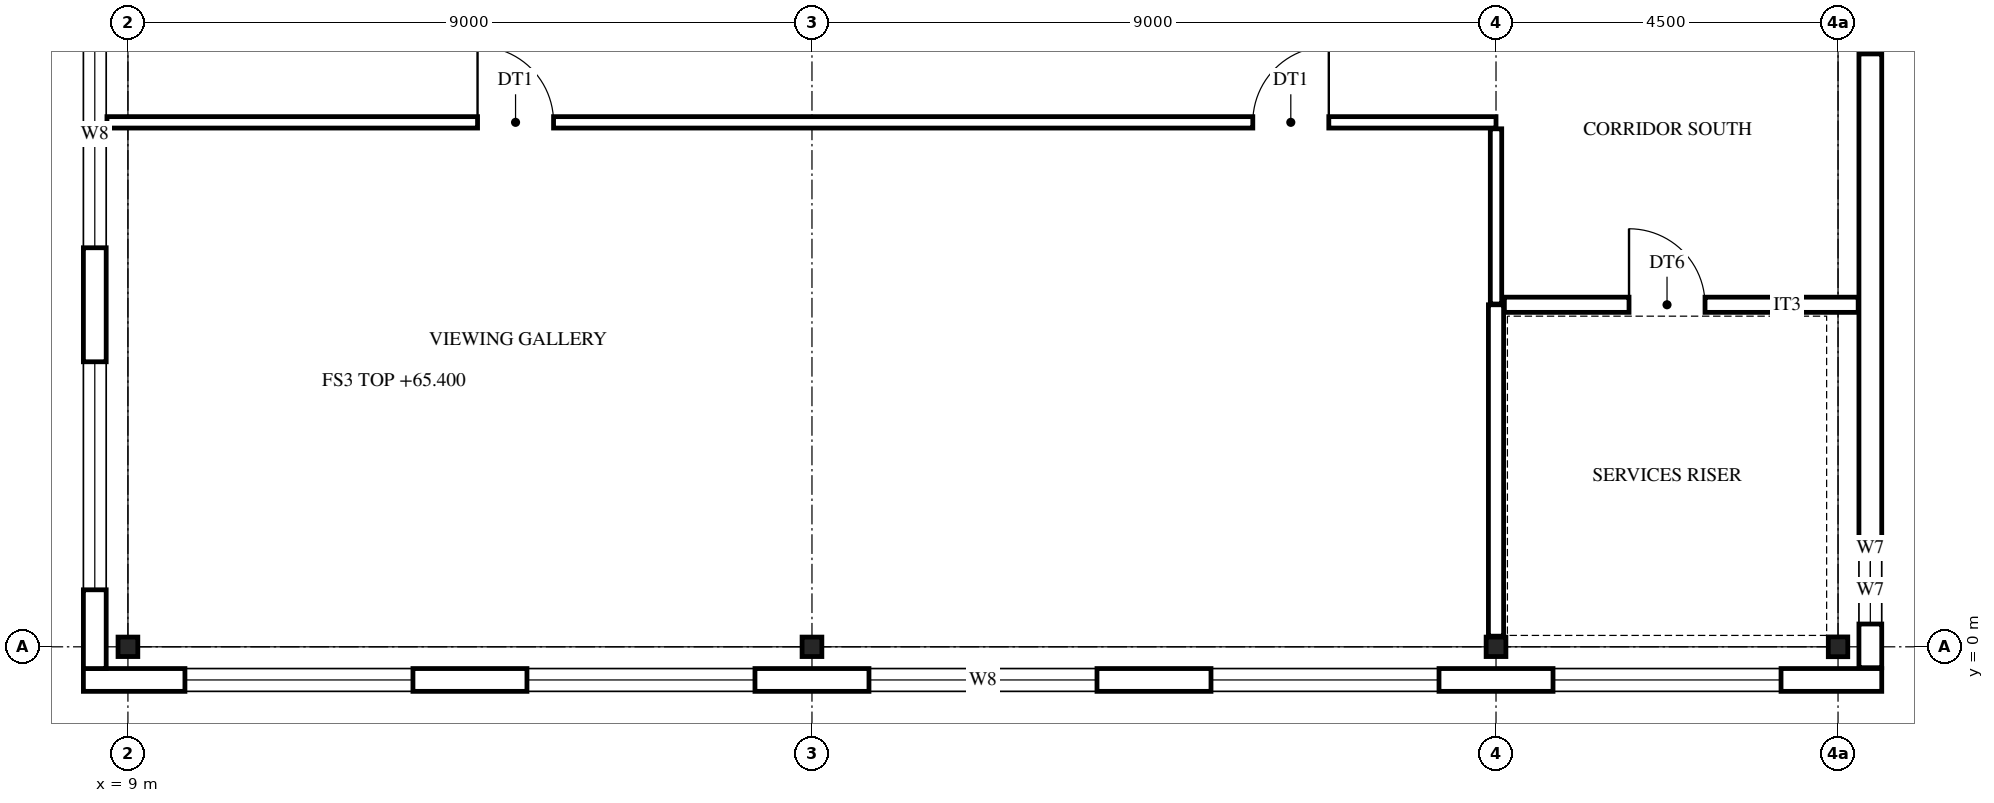
"""IFC4 building model, lengths in metres.
Left out: names, types, materials, properties, quantities, classifications, styles, units other than length and angle.
Written with IfcOpenShell. Run it as: python <this file> out.ifc"""

import sys

from ifc_helpers import new_model, si_unit, direction, frame, frame_2d, origin, origin_2d, place, context, subcontext, project, spatial, rectangle, i_section, extrude, element, fill, save


model = new_model("IFC4")
c1 = context("Model", 3, precision=1e-05, world=origin(), true_north=direction((0.0, 1.0)))
c2 = subcontext(c1, "Body", "Model", "MODEL_VIEW")
j1 = project(units=[si_unit("LENGTHUNIT", "METRE"), si_unit("PLANEANGLEUNIT", "RADIAN")], contexts=[c1])
p1 = place(None, origin())
s1 = spatial("IfcSite", under=j1, at=p1, CompositionType="ELEMENT")
p2 = place(p1, origin())
s2 = spatial("IfcBuilding", under=s1, at=p2, CompositionType="ELEMENT")
p3 = place(p2, frame((0.0, 0.0, 65.4)))
s3 = spatial("IfcBuildingStorey", under=s2, at=p3, CompositionType="ELEMENT", Elevation=65.4)
for number, where, z_axis, x_axis in (
    (1, (9.0, 0.0, 0.0), (0.0, 0.0, 1.0), (0.0, 1.0, 0.0)),
    (2, (18.0, 0.0, 0.0), (0.0, 0.0, 1.0), (0.0, 1.0, 0.0)),
    (3, (27.0, 0.0, 0.0), (0.0, 0.0, 1.0), (0.0, 1.0, 0.0)),
    (4, (31.5, 0.0, 0.0), (0.0, 0.0, 1.0), (1.0, 0.0, 0.0)),
):
    element("IfcColumn", number, at=place(p3, frame(where, z_axis=z_axis, x_axis=x_axis)), inside=s3, PredefinedType="COLUMN", context=c2, shape_type="SweptSolid", body=[
        extrude(i_section(OverallWidth=0.256, OverallDepth=0.26, WebThickness=0.01, FlangeThickness=0.017, FilletRadius=0.014, at=origin_2d()), origin(), (0.0, 0.0, 1.0), 4.5),
    ])
p4 = place(p3, frame((32.075, -0.436, 0.0), z_axis=(0.0, 0.0, 1.0), x_axis=(-1.0, 0.0, 0.0)))
e5 = element("IfcWall", 5, at=p4, inside=s3, PredefinedType="STANDARD", context=c2, shape_type="SweptSolid", body=[
    extrude(rectangle(XDim=23.661, YDim=0.3, at=frame_2d((11.831, 0.0))), origin(), (0.0, 0.0, 1.0), 4.5),
])
p5 = place(p4, frame((19.325, 0.0, 0.6)))
e6 = element("IfcOpeningElement", 6, at=p5, cuts=e5, PredefinedType="OPENING", context=c2, shape_type="SweptSolid", body=[
    extrude(rectangle(XDim=3.0, YDim=3.1, at=frame_2d((1.5, 1.55))), frame((0.0, 0.16, 0.0), z_axis=(0.0, -1.0, 0.0), x_axis=(1.0, 0.0, 0.0)), (0.0, 0.0, 1.0), 0.32),
])
p6 = place(p4, frame((14.825, 0.0, 0.6)))
e7 = element("IfcOpeningElement", 7, at=p6, cuts=e5, PredefinedType="OPENING", context=c2, shape_type="SweptSolid", body=[
    extrude(rectangle(XDim=3.0, YDim=3.1, at=frame_2d((1.5, 1.55))), frame((0.0, 0.16, 0.0), z_axis=(0.0, -1.0, 0.0), x_axis=(1.0, 0.0, 0.0)), (0.0, 0.0, 1.0), 0.32),
])
p7 = place(p4, frame((10.325, 0.0, 0.6)))
e8 = element("IfcOpeningElement", 8, at=p7, cuts=e5, PredefinedType="OPENING", context=c2, shape_type="SweptSolid", body=[
    extrude(rectangle(XDim=3.0, YDim=3.1, at=frame_2d((1.5, 1.55))), frame((0.0, 0.16, 0.0), z_axis=(0.0, -1.0, 0.0), x_axis=(1.0, 0.0, 0.0)), (0.0, 0.0, 1.0), 0.32),
])
p8 = place(p4, frame((5.825, 0.0, 0.6)))
e9 = element("IfcOpeningElement", 9, at=p8, cuts=e5, PredefinedType="OPENING", context=c2, shape_type="SweptSolid", body=[
    extrude(rectangle(XDim=3.0, YDim=3.1, at=frame_2d((1.5, 1.55))), frame((0.0, 0.16, 0.0), z_axis=(0.0, -1.0, 0.0), x_axis=(1.0, 0.0, 0.0)), (0.0, 0.0, 1.0), 0.32),
])
p9 = place(p4, frame((1.325, 0.0, 0.6)))
e10 = element("IfcOpeningElement", 10, at=p9, cuts=e5, PredefinedType="OPENING", context=c2, shape_type="SweptSolid", body=[
    extrude(rectangle(XDim=3.0, YDim=3.1, at=frame_2d((1.5, 1.55))), frame((0.0, 0.16, 0.0), z_axis=(0.0, -1.0, 0.0), x_axis=(1.0, 0.0, 0.0)), (0.0, 0.0, 1.0), 0.32),
])
p10 = place(p3, frame((8.564, -0.286, 0.0), z_axis=(0.0, 0.0, 1.0), x_axis=(0.0, 1.0, 0.0)))
e11 = element("IfcWall", 11, at=p10, inside=s3, PredefinedType="STANDARD", context=c2, shape_type="SweptSolid", body=[
    extrude(rectangle(XDim=27.572, YDim=0.3, at=frame_2d((13.786, 0.0))), origin(), (0.0, 0.0, 1.0), 4.5),
])
p11 = place(p10, frame((1.036, 0.0, 0.6)))
e12 = element("IfcOpeningElement", 12, at=p11, cuts=e11, PredefinedType="OPENING", context=c2, shape_type="SweptSolid", body=[
    extrude(rectangle(XDim=3.0, YDim=3.1, at=frame_2d((1.5, 1.55))), frame((0.0, 0.16, 0.0), z_axis=(0.0, -1.0, 0.0), x_axis=(1.0, 0.0, 0.0)), (0.0, 0.0, 1.0), 0.32),
])
p12 = place(p10, frame((5.536, 0.0, 0.6)))
e13 = element("IfcOpeningElement", 13, at=p12, cuts=e11, PredefinedType="OPENING", context=c2, shape_type="SweptSolid", body=[
    extrude(rectangle(XDim=3.0, YDim=3.1, at=frame_2d((1.5, 1.55))), frame((0.0, 0.16, 0.0), z_axis=(0.0, -1.0, 0.0), x_axis=(1.0, 0.0, 0.0)), (0.0, 0.0, 1.0), 0.32),
])
p13 = place(p10, frame((19.036, 0.0, 0.6)))
e14 = element("IfcOpeningElement", 14, at=p13, cuts=e11, PredefinedType="OPENING", context=c2, shape_type="SweptSolid", body=[
    extrude(rectangle(XDim=3.0, YDim=3.1, at=frame_2d((1.5, 1.55))), frame((0.0, 0.16, 0.0), z_axis=(0.0, -1.0, 0.0), x_axis=(1.0, 0.0, 0.0)), (0.0, 0.0, 1.0), 0.32),
])
p14 = place(p10, frame((23.536, 0.0, 0.6)))
e15 = element("IfcOpeningElement", 15, at=p14, cuts=e11, PredefinedType="OPENING", context=c2, shape_type="SweptSolid", body=[
    extrude(rectangle(XDim=3.0, YDim=3.1, at=frame_2d((1.5, 1.55))), frame((0.0, 0.16, 0.0), z_axis=(0.0, -1.0, 0.0), x_axis=(1.0, 0.0, 0.0)), (0.0, 0.0, 1.0), 0.32),
])
p15 = place(p3, frame((31.925, 18.275, 0.0), z_axis=(0.0, 0.0, 1.0), x_axis=(0.0, -1.0, 0.0)))
e16 = element("IfcWall", 16, at=p15, inside=s3, PredefinedType="STANDARD", context=c2, shape_type="SweptSolid", body=[
    extrude(rectangle(XDim=18.55, YDim=0.3, at=frame_2d((9.275, 0.0))), origin(), (0.0, 0.0, 1.0), 4.5),
])
p16 = place(p15, frame((17.075, 0.0, 0.6)))
e17 = element("IfcOpeningElement", 17, at=p16, cuts=e16, PredefinedType="OPENING", context=c2, shape_type="SweptSolid", body=[
    extrude(rectangle(XDim=0.9, YDim=2.3, at=frame_2d((0.45, 1.15))), frame((0.0, 0.16, 0.0), z_axis=(0.0, -1.0, 0.0), x_axis=(1.0, 0.0, 0.0)), (0.0, 0.0, 1.0), 0.32),
])
p17 = place(p15, frame((9.575, 0.0, 0.6)))
e18 = element("IfcOpeningElement", 18, at=p17, cuts=e16, PredefinedType="OPENING", context=c2, shape_type="SweptSolid", body=[
    extrude(rectangle(XDim=0.9, YDim=2.3, at=frame_2d((0.45, 1.15))), frame((0.0, 0.16, 0.0), z_axis=(0.0, -1.0, 0.0), x_axis=(1.0, 0.0, 0.0)), (0.0, 0.0, 1.0), 0.32),
])
p18 = place(p15, frame((6.725, 0.0, 1.6)))
e19 = element("IfcOpeningElement", 19, at=p18, cuts=e16, PredefinedType="OPENING", context=c2, shape_type="SweptSolid", body=[
    extrude(rectangle(XDim=0.6, YDim=0.9, at=frame_2d((0.3, 0.45))), frame((0.0, 0.16, 0.0), z_axis=(0.0, -1.0, 0.0), x_axis=(1.0, 0.0, 0.0)), (0.0, 0.0, 1.0), 0.32),
])
p19 = place(p15, frame((2.225, 0.0, 1.6)))
e20 = element("IfcOpeningElement", 20, at=p19, cuts=e16, PredefinedType="OPENING", context=c2, shape_type="SweptSolid", body=[
    extrude(rectangle(XDim=0.6, YDim=0.9, at=frame_2d((0.3, 0.45))), frame((0.0, 0.16, 0.0), z_axis=(0.0, -1.0, 0.0), x_axis=(1.0, 0.0, 0.0)), (0.0, 0.0, 1.0), 0.32),
])
p20 = place(p3, frame((27.0, 0.14, 0.0), z_axis=(0.0, 0.0, 1.0), x_axis=(0.0, 1.0, 0.0)))
e21 = element("IfcWall", 21, at=p20, inside=s3, PredefinedType="PARTITIONING", context=c2, shape_type="SweptSolid", body=[
    extrude(rectangle(XDim=4.36, YDim=0.2, at=frame_2d((2.18, 0.0))), origin(), (0.0, 0.0, 1.0), 3.723),
])
p21 = place(p3, frame((27.0, 4.51, 0.0), z_axis=(0.0, 0.0, 1.0), x_axis=(0.0, 1.0, 0.0)))
e22 = element("IfcWall", 22, at=p21, inside=s3, PredefinedType="PARTITIONING", context=c2, shape_type="SweptSolid", body=[
    extrude(rectangle(XDim=2.305, YDim=0.15, at=frame_2d((1.152, 0.0))), origin(), (0.0, 0.0, 1.0), 3.723),
])
p22 = place(p3, frame((27.11, 4.5, 0.0), z_axis=(0.0, 0.0, 1.0), x_axis=(1.0, 0.0, 0.0)))
e23 = element("IfcWall", 23, at=p22, inside=s3, PredefinedType="PARTITIONING", context=c2, shape_type="SweptSolid", body=[
    extrude(rectangle(XDim=4.655, YDim=0.2, at=frame_2d((2.327, 0.0))), origin(), (0.0, 0.0, 1.0), 3.723),
])
p23 = place(p22, frame((1.64, 0.0, 0.0)))
e24 = element("IfcOpeningElement", 24, at=p23, cuts=e23, PredefinedType="OPENING", context=c2, shape_type="SweptSolid", body=[
    extrude(rectangle(XDim=1.0, YDim=2.1, at=frame_2d((0.5, 1.05))), frame((0.0, 0.11, 0.0), z_axis=(0.0, -1.0, 0.0), x_axis=(1.0, 0.0, 0.0)), (0.0, 0.0, 1.0), 0.22),
])
p24 = place(p3, frame((8.724, 6.9, 0.0), z_axis=(0.0, 0.0, 1.0), x_axis=(1.0, 0.0, 0.0)))
e25 = element("IfcWall", 25, at=p24, inside=s3, PredefinedType="PARTITIONING", context=c2, shape_type="SweptSolid", body=[
    extrude(rectangle(XDim=18.276, YDim=0.15, at=frame_2d((9.138, 0.0))), origin(), (0.0, 0.0, 1.0), 3.723),
])
p25 = place(p24, frame((15.076, 0.0, 0.0)))
e26 = element("IfcOpeningElement", 26, at=p25, cuts=e25, PredefinedType="OPENING", context=c2, shape_type="SweptSolid", body=[
    extrude(rectangle(XDim=1.0, YDim=2.1, at=frame_2d((0.5, 1.05))), frame((0.0, 0.085, 0.0), z_axis=(0.0, -1.0, 0.0), x_axis=(1.0, 0.0, 0.0)), (0.0, 0.0, 1.0), 0.17),
])
p26 = place(p24, frame((4.876, 0.0, 0.0)))
e27 = element("IfcOpeningElement", 27, at=p26, cuts=e25, PredefinedType="OPENING", context=c2, shape_type="SweptSolid", body=[
    extrude(rectangle(XDim=1.0, YDim=2.1, at=frame_2d((0.5, 1.05))), frame((0.0, 0.085, 0.0), z_axis=(0.0, -1.0, 0.0), x_axis=(1.0, 0.0, 0.0)), (0.0, 0.0, 1.0), 0.17),
])
p27 = place(p5, origin())
e28 = element("IfcWindow", 28, at=p27, inside=s3, PartitioningType="SINGLE_PANEL", PredefinedType="WINDOW", context=c2, shape_type="SweptSolid", body=[
    extrude(rectangle(XDim=3.0, YDim=3.1, at=frame_2d((1.5, 1.55))), frame((0.0, 0.03, 0.0), z_axis=(0.0, -1.0, 0.0), x_axis=(1.0, 0.0, 0.0)), (0.0, 0.0, 1.0), 0.06),
])
fill(e6, e28)
p28 = place(p6, origin())
e29 = element("IfcWindow", 29, at=p28, inside=s3, PartitioningType="SINGLE_PANEL", PredefinedType="WINDOW", context=c2, shape_type="SweptSolid", body=[
    extrude(rectangle(XDim=3.0, YDim=3.1, at=frame_2d((1.5, 1.55))), frame((0.0, 0.03, 0.0), z_axis=(0.0, -1.0, 0.0), x_axis=(1.0, 0.0, 0.0)), (0.0, 0.0, 1.0), 0.06),
])
fill(e7, e29)
p29 = place(p7, origin())
e30 = element("IfcWindow", 30, at=p29, inside=s3, PartitioningType="SINGLE_PANEL", PredefinedType="WINDOW", context=c2, shape_type="SweptSolid", body=[
    extrude(rectangle(XDim=3.0, YDim=3.1, at=frame_2d((1.5, 1.55))), frame((0.0, 0.03, 0.0), z_axis=(0.0, -1.0, 0.0), x_axis=(1.0, 0.0, 0.0)), (0.0, 0.0, 1.0), 0.06),
])
fill(e8, e30)
p30 = place(p8, origin())
e31 = element("IfcWindow", 31, at=p30, inside=s3, PartitioningType="SINGLE_PANEL", PredefinedType="WINDOW", context=c2, shape_type="SweptSolid", body=[
    extrude(rectangle(XDim=3.0, YDim=3.1, at=frame_2d((1.5, 1.55))), frame((0.0, 0.03, 0.0), z_axis=(0.0, -1.0, 0.0), x_axis=(1.0, 0.0, 0.0)), (0.0, 0.0, 1.0), 0.06),
])
fill(e9, e31)
p31 = place(p9, origin())
e32 = element("IfcWindow", 32, at=p31, inside=s3, PartitioningType="SINGLE_PANEL", PredefinedType="WINDOW", context=c2, shape_type="SweptSolid", body=[
    extrude(rectangle(XDim=3.0, YDim=3.1, at=frame_2d((1.5, 1.55))), frame((0.0, 0.03, 0.0), z_axis=(0.0, -1.0, 0.0), x_axis=(1.0, 0.0, 0.0)), (0.0, 0.0, 1.0), 0.06),
])
fill(e10, e32)
p32 = place(p11, origin())
e33 = element("IfcWindow", 33, at=p32, inside=s3, PartitioningType="SINGLE_PANEL", PredefinedType="WINDOW", context=c2, shape_type="SweptSolid", body=[
    extrude(rectangle(XDim=3.0, YDim=3.1, at=frame_2d((1.5, 1.55))), frame((0.0, 0.03, 0.0), z_axis=(0.0, -1.0, 0.0), x_axis=(1.0, 0.0, 0.0)), (0.0, 0.0, 1.0), 0.06),
])
fill(e12, e33)
p33 = place(p12, origin())
e34 = element("IfcWindow", 34, at=p33, inside=s3, PartitioningType="SINGLE_PANEL", PredefinedType="WINDOW", context=c2, shape_type="SweptSolid", body=[
    extrude(rectangle(XDim=3.0, YDim=3.1, at=frame_2d((1.5, 1.55))), frame((0.0, 0.03, 0.0), z_axis=(0.0, -1.0, 0.0), x_axis=(1.0, 0.0, 0.0)), (0.0, 0.0, 1.0), 0.06),
])
fill(e13, e34)
p34 = place(p16, origin())
e35 = element("IfcWindow", 35, at=p34, inside=s3, PartitioningType="SINGLE_PANEL", PredefinedType="WINDOW", context=c2, shape_type="SweptSolid", body=[
    extrude(rectangle(XDim=0.9, YDim=2.3, at=frame_2d((0.45, 1.15))), frame((0.0, 0.03, 0.0), z_axis=(0.0, -1.0, 0.0), x_axis=(1.0, 0.0, 0.0)), (0.0, 0.0, 1.0), 0.06),
])
fill(e17, e35)
p35 = place(p17, origin())
e36 = element("IfcWindow", 36, at=p35, inside=s3, PartitioningType="SINGLE_PANEL", PredefinedType="WINDOW", context=c2, shape_type="SweptSolid", body=[
    extrude(rectangle(XDim=0.9, YDim=2.3, at=frame_2d((0.45, 1.15))), frame((0.0, 0.03, 0.0), z_axis=(0.0, -1.0, 0.0), x_axis=(1.0, 0.0, 0.0)), (0.0, 0.0, 1.0), 0.06),
])
fill(e18, e36)
p36 = place(p23, frame((1.0, 0.0, 0.0), z_axis=(0.0, 0.0, 1.0), x_axis=(-1.0, 0.0, 0.0)))
e37 = element("IfcDoor", 37, at=p36, inside=s3, OperationType="SINGLE_SWING_LEFT", PredefinedType="DOOR", context=c2, shape_type="SweptSolid", body=[
    extrude(rectangle(XDim=1.0, YDim=2.1, at=frame_2d((0.5, 1.05))), frame((0.0, 0.025, 0.0), z_axis=(0.0, -1.0, 0.0), x_axis=(1.0, 0.0, 0.0)), (0.0, 0.0, 1.0), 0.05),
])
fill(e24, e37)
p37 = place(p25, frame((1.0, 0.0, 0.0), z_axis=(0.0, 0.0, 1.0), x_axis=(-1.0, 0.0, 0.0)))
e38 = element("IfcDoor", 38, at=p37, inside=s3, OperationType="SINGLE_SWING_RIGHT", PredefinedType="DOOR", context=c2, shape_type="SweptSolid", body=[
    extrude(rectangle(XDim=1.0, YDim=2.1, at=frame_2d((0.5, 1.05))), frame((0.0, 0.025, 0.0), z_axis=(0.0, -1.0, 0.0), x_axis=(1.0, 0.0, 0.0)), (0.0, 0.0, 1.0), 0.05),
])
fill(e26, e38)
p38 = place(p26, frame((1.0, 0.0, 0.0), z_axis=(0.0, 0.0, 1.0), x_axis=(-1.0, 0.0, 0.0)))
e39 = element("IfcDoor", 39, at=p38, inside=s3, OperationType="SINGLE_SWING_LEFT", PredefinedType="DOOR", context=c2, shape_type="SweptSolid", body=[
    extrude(rectangle(XDim=1.0, YDim=2.1, at=frame_2d((0.5, 1.05))), frame((0.0, 0.025, 0.0), z_axis=(0.0, -1.0, 0.0), x_axis=(1.0, 0.0, 0.0)), (0.0, 0.0, 1.0), 0.05),
])
fill(e27, e39)
save(model, sys.argv[1])
